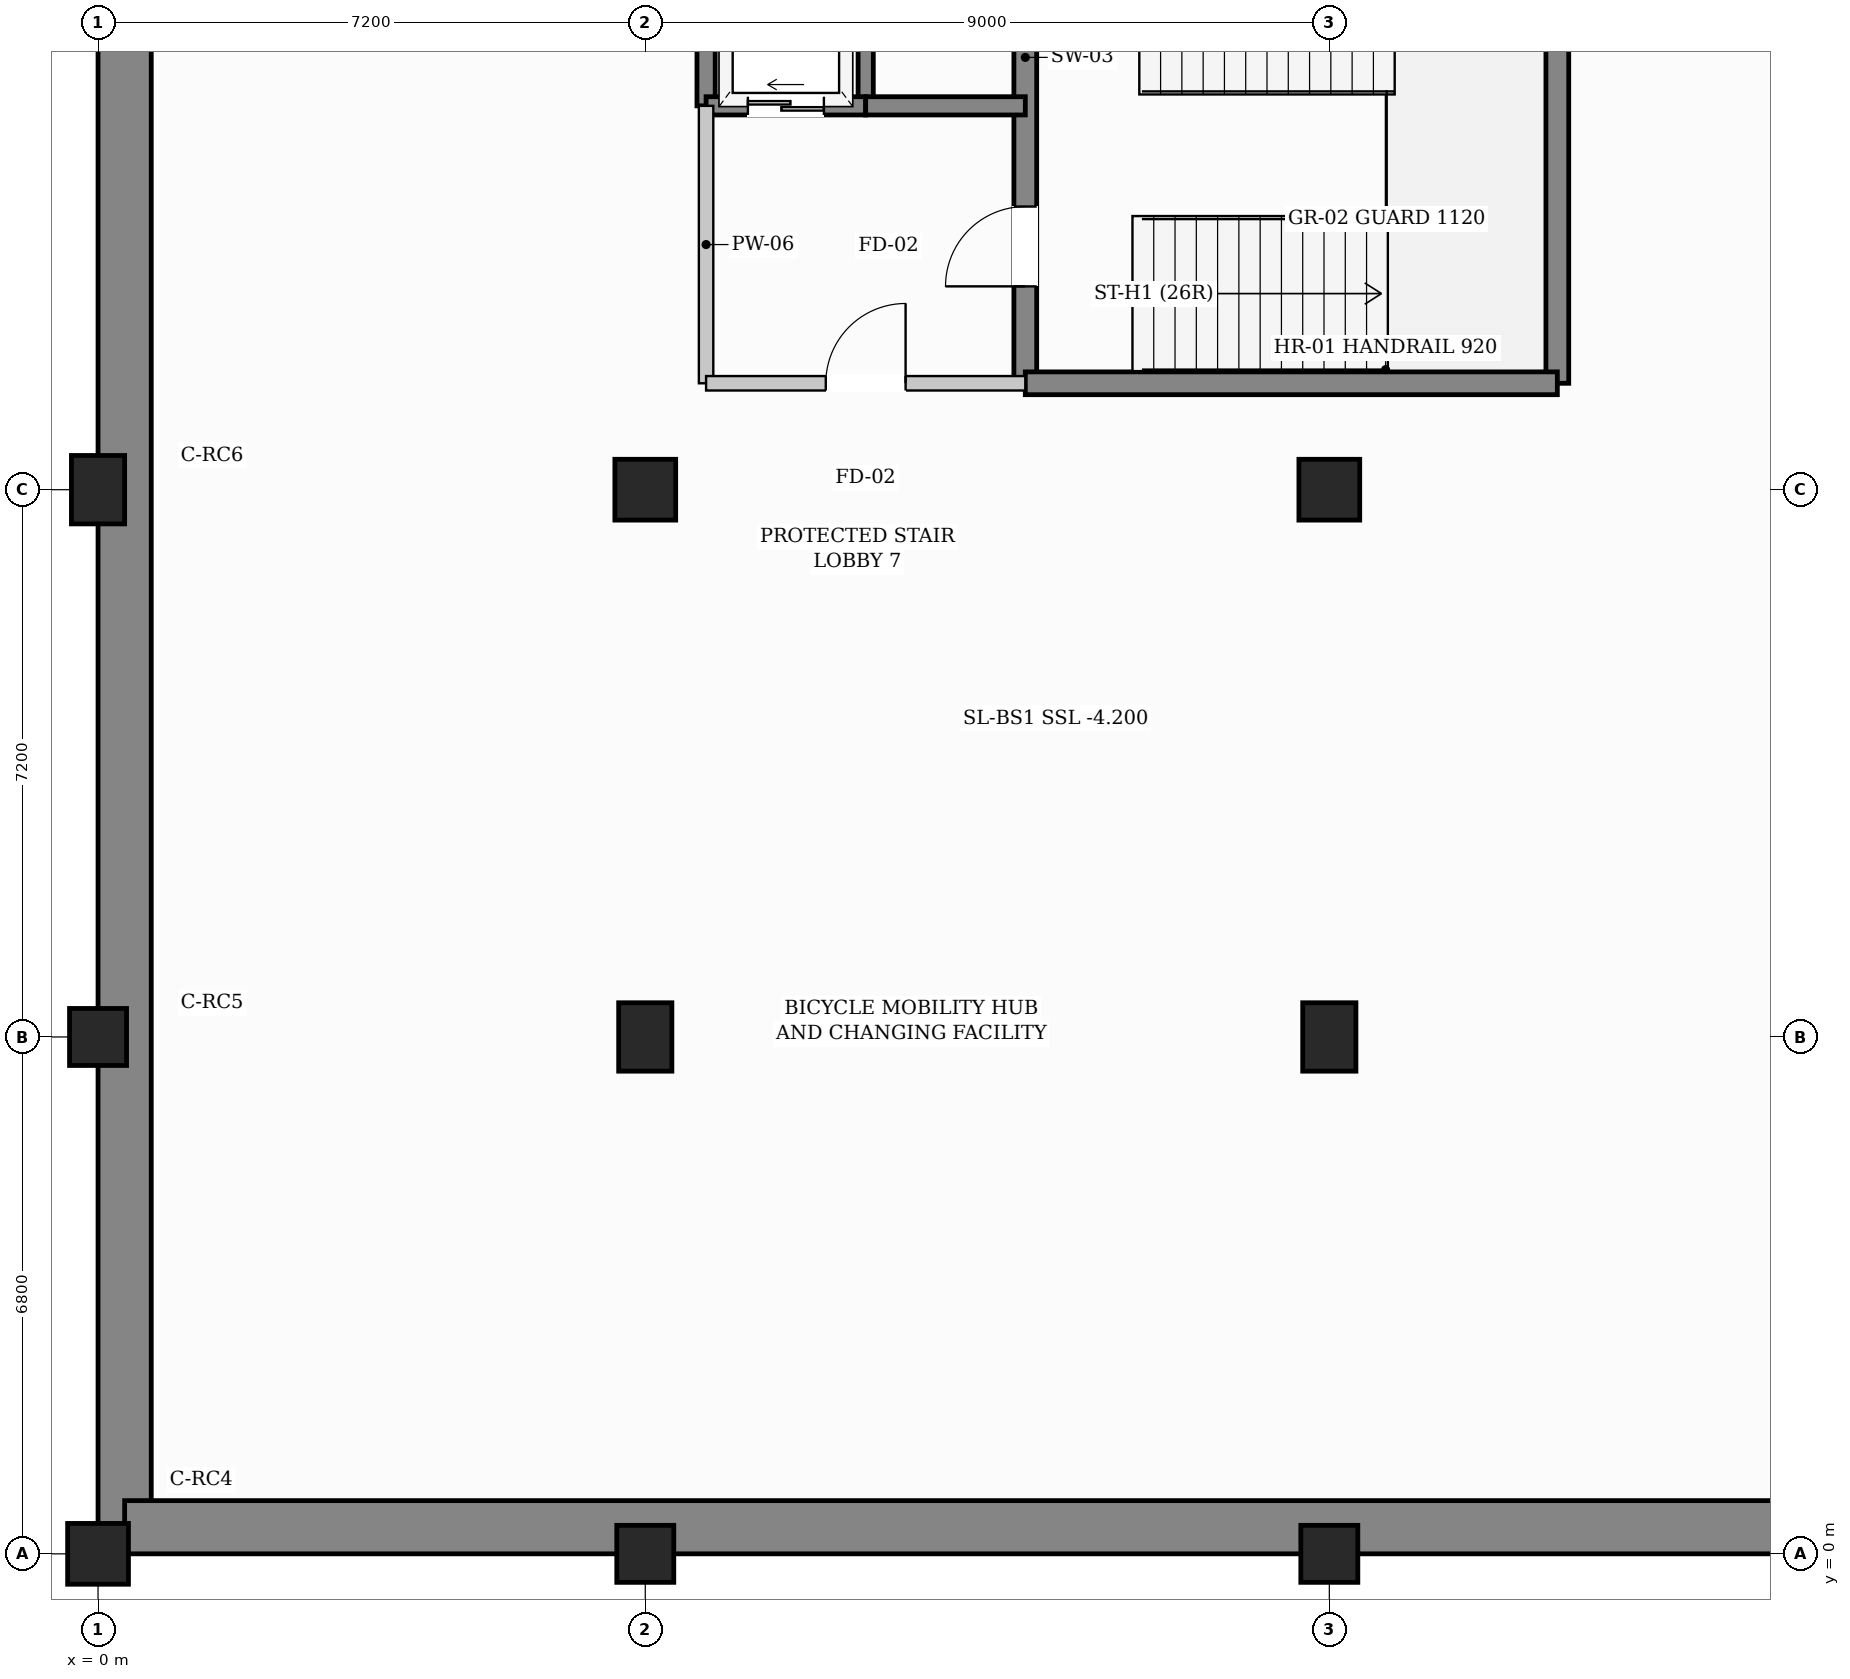
"""IFC4 building model, lengths in metres.
Left out: names, types, materials, properties, quantities, classifications, styles, units other than length and angle.
Written with IfcOpenShell. Run it as: python <this file> out.ifc"""

import sys

from ifc_helpers import new_model, si_unit, direction, frame, frame_2d, origin, origin_with_axes, origin_2d, place, context, subcontext, project, spatial, rectangle, extrude, element, fill, save


model = new_model("IFC4")
c1 = context("Model", 3, precision=1e-05, world=origin(), true_north=direction((0.0, 1.0)))
c2 = subcontext(c1, "Body", "Model", "MODEL_VIEW")
j1 = project(units=[si_unit("LENGTHUNIT", "METRE"), si_unit("PLANEANGLEUNIT", "RADIAN")], contexts=[c1])
p1 = place(None, origin())
s1 = spatial("IfcSite", under=j1, at=p1, CompositionType="ELEMENT")
p2 = place(p1, origin())
s2 = spatial("IfcBuilding", under=s1, at=p2, CompositionType="ELEMENT")
p3 = place(p2, frame((0.0, 0.0, -4.2)))
s3 = spatial("IfcBuildingStorey", under=s2, at=p3, CompositionType="ELEMENT", Elevation=-4.2)
p4 = place(p3, origin_with_axes())
e1 = element("IfcColumn", 1, at=p4, inside=s3, PredefinedType="COLUMN", context=c2, shape_type="SweptSolid", body=[
    extrude(rectangle(XDim=0.8, YDim=0.8, at=origin_2d()), origin(), (0.0, 0.0, 1.0), 4.2),
])
p5 = place(p3, frame((0.0, 6.8, 0.0), z_axis=(0.0, 0.0, 1.0), x_axis=(1.0, 0.0, 0.0)))
e2 = element("IfcColumn", 2, at=p5, inside=s3, PredefinedType="COLUMN", context=c2, shape_type="SweptSolid", body=[
    extrude(rectangle(XDim=0.75, YDim=0.75, at=origin_2d()), origin(), (0.0, 0.0, 1.0), 4.2),
])
p6 = place(p3, frame((0.0, 14.0, 0.0), z_axis=(0.0, 0.0, 1.0), x_axis=(1.0, 0.0, 0.0)))
e3 = element("IfcColumn", 3, at=p6, inside=s3, PredefinedType="COLUMN", context=c2, shape_type="SweptSolid", body=[
    extrude(rectangle(XDim=0.7, YDim=0.9, at=origin_2d()), origin(), (0.0, 0.0, 1.0), 4.2),
])
p7 = place(p3, frame((7.2, 0.0, 0.0), z_axis=(0.0, 0.0, 1.0), x_axis=(1.0, 0.0, 0.0)))
e4 = element("IfcColumn", 4, at=p7, inside=s3, PredefinedType="COLUMN", context=c2, shape_type="SweptSolid", body=[
    extrude(rectangle(XDim=0.75, YDim=0.75, at=origin_2d()), origin(), (0.0, 0.0, 1.0), 4.2),
])
p8 = place(p3, frame((7.2, 6.8, 0.0), z_axis=(0.0, 0.0, 1.0), x_axis=(1.0, 0.0, 0.0)))
e5 = element("IfcColumn", 5, at=p8, inside=s3, PredefinedType="COLUMN", context=c2, shape_type="SweptSolid", body=[
    extrude(rectangle(XDim=0.7, YDim=0.9, at=origin_2d()), origin(), (0.0, 0.0, 1.0), 4.2),
])
p9 = place(p3, frame((7.2, 14.0, 0.0), z_axis=(0.0, 0.0, 1.0), x_axis=(1.0, 0.0, 0.0)))
e6 = element("IfcColumn", 6, at=p9, inside=s3, PredefinedType="COLUMN", context=c2, shape_type="SweptSolid", body=[
    extrude(rectangle(XDim=0.8, YDim=0.8, at=origin_2d()), origin(), (0.0, 0.0, 1.0), 4.2),
])
p10 = place(p3, frame((16.2, 0.0, 0.0), z_axis=(0.0, 0.0, 1.0), x_axis=(1.0, 0.0, 0.0)))
e7 = element("IfcColumn", 7, at=p10, inside=s3, PredefinedType="COLUMN", context=c2, shape_type="SweptSolid", body=[
    extrude(rectangle(XDim=0.75, YDim=0.75, at=origin_2d()), origin(), (0.0, 0.0, 1.0), 4.2),
])
p11 = place(p3, frame((16.2, 6.8, 0.0), z_axis=(0.0, 0.0, 1.0), x_axis=(1.0, 0.0, 0.0)))
e8 = element("IfcColumn", 8, at=p11, inside=s3, PredefinedType="COLUMN", context=c2, shape_type="SweptSolid", body=[
    extrude(rectangle(XDim=0.7, YDim=0.9, at=origin_2d()), origin(), (0.0, 0.0, 1.0), 4.2),
])
p12 = place(p3, frame((16.2, 14.0, 0.0), z_axis=(0.0, 0.0, 1.0), x_axis=(1.0, 0.0, 0.0)))
e9 = element("IfcColumn", 9, at=p12, inside=s3, PredefinedType="COLUMN", context=c2, shape_type="SweptSolid", body=[
    extrude(rectangle(XDim=0.8, YDim=0.8, at=origin_2d()), origin(), (0.0, 0.0, 1.0), 4.2),
])
p13 = place(p3, frame((0.35, 0.35, 0.0), z_axis=(0.0, 0.0, 1.0), x_axis=(0.0, 1.0, 0.0)))
e10 = element("IfcWall", 10, at=p13, inside=s3, PredefinedType="SOLIDWALL", context=c2, shape_type="SweptSolid", body=[
    extrude(rectangle(XDim=115.3, YDim=0.7, at=frame_2d((57.65, 0.0))), origin(), (0.0, 0.0, 1.0), 3.84),
])
p14 = place(p3, frame((96.825, 0.35, 0.0), z_axis=(0.0, 0.0, 1.0), x_axis=(-1.0, 0.0, 0.0)))
e11 = element("IfcWall", 11, at=p14, inside=s3, PredefinedType="SOLIDWALL", context=c2, shape_type="SweptSolid", body=[
    extrude(rectangle(XDim=96.475, YDim=0.7, at=frame_2d((48.237, 0.0))), origin(), (0.0, 0.0, 1.0), 3.84),
])
p15 = place(p3, frame((12.2, 15.4, 0.0), z_axis=(0.0, 0.0, 1.0), x_axis=(0.0, 1.0, 0.0)))
e12 = element("IfcWall", 12, at=p15, inside=s3, PredefinedType="SHEAR", context=c2, shape_type="SweptSolid", body=[
    extrude(rectangle(XDim=6.0, YDim=0.3, at=frame_2d((3.0, 0.0))), origin(), (0.0, 0.0, 1.0), 3.84),
])
p16 = place(p15, frame((1.275, 0.0, 0.0)))
e13 = element("IfcOpeningElement", 13, at=p16, cuts=e12, PredefinedType="OPENING", context=c2, shape_type="SweptSolid", body=[
    extrude(rectangle(XDim=1.05, YDim=2.15, at=frame_2d((0.525, 1.075))), frame((0.0, 0.16, 0.0), z_axis=(0.0, -1.0, 0.0), x_axis=(1.0, 0.0, 0.0)), (0.0, 0.0, 1.0), 0.32),
])
p17 = place(p3, frame((19.2, 15.4, 0.0), z_axis=(0.0, 0.0, 1.0), x_axis=(0.0, 1.0, 0.0)))
e14 = element("IfcWall", 14, at=p17, inside=s3, PredefinedType="SHEAR", context=c2, shape_type="SweptSolid", body=[
    extrude(rectangle(XDim=6.0, YDim=0.3, at=frame_2d((3.0, 0.0))), origin(), (0.0, 0.0, 1.0), 3.84),
])
p18 = place(p3, frame((12.2, 15.4, 0.0), z_axis=(0.0, 0.0, 1.0), x_axis=(1.0, 0.0, 0.0)))
e15 = element("IfcWall", 15, at=p18, inside=s3, PredefinedType="SHEAR", context=c2, shape_type="SweptSolid", body=[
    extrude(rectangle(XDim=7.0, YDim=0.3, at=frame_2d((3.5, 0.0))), origin(), (0.0, 0.0, 1.0), 3.84),
])
p19 = place(p3, frame((8.0, 19.05, 0.0), z_axis=(0.0, 0.0, 1.0), x_axis=(0.0, 1.0, 0.0)))
e16 = element("IfcWall", 16, at=p19, inside=s3, PredefinedType="SHEAR", context=c2, shape_type="SweptSolid", body=[
    extrude(rectangle(XDim=2.35, YDim=0.24, at=frame_2d((1.175, 0.0))), origin(), (0.0, 0.0, 1.0), 3.84),
])
p20 = place(p3, frame((10.1, 19.05, 0.0), z_axis=(0.0, 0.0, 1.0), x_axis=(0.0, 1.0, 0.0)))
e17 = element("IfcWall", 17, at=p20, inside=s3, PredefinedType="SHEAR", context=c2, shape_type="SweptSolid", body=[
    extrude(rectangle(XDim=2.35, YDim=0.2, at=frame_2d((1.175, 0.0))), origin(), (0.0, 0.0, 1.0), 3.84),
])
p21 = place(p3, frame((8.0, 19.05, 0.0), z_axis=(0.0, 0.0, 1.0), x_axis=(1.0, 0.0, 0.0)))
e18 = element("IfcWall", 18, at=p21, inside=s3, PredefinedType="SHEAR", context=c2, shape_type="SweptSolid", body=[
    extrude(rectangle(XDim=2.1, YDim=0.24, at=frame_2d((1.05, 0.0))), origin(), (0.0, 0.0, 1.0), 3.84),
])
p22 = place(p21, frame((0.55, 0.0, 0.0)))
e19 = element("IfcOpeningElement", 19, at=p22, cuts=e18, PredefinedType="OPENING", context=c2, shape_type="SweptSolid", body=[
    extrude(rectangle(XDim=1.0, YDim=2.1, at=frame_2d((0.5, 1.05))), frame((0.0, 0.13, 0.0), z_axis=(0.0, -1.0, 0.0), x_axis=(1.0, 0.0, 0.0)), (0.0, 0.0, 1.0), 0.26),
])
p23 = place(p3, frame((10.1, 19.05, 0.0), z_axis=(0.0, 0.0, 1.0), x_axis=(1.0, 0.0, 0.0)))
e20 = element("IfcWall", 20, at=p23, inside=s3, PredefinedType="SHEAR", context=c2, shape_type="SweptSolid", body=[
    extrude(rectangle(XDim=2.1, YDim=0.24, at=frame_2d((1.05, 0.0))), origin(), (0.0, 0.0, 1.0), 3.84),
])
p24 = place(p3, frame((8.0, 15.4, 0.0), z_axis=(0.0, 0.0, 1.0), x_axis=(0.0, 1.0, 0.0)))
e21 = element("IfcWall", 21, at=p24, inside=s3, PredefinedType="PARTITIONING", context=c2, shape_type="SweptSolid", body=[
    extrude(rectangle(XDim=3.65, YDim=0.19, at=frame_2d((1.825, 0.0))), origin(), (0.0, 0.0, 1.0), 3.84),
])
p25 = place(p3, frame((8.0, 15.4, 0.0), z_axis=(0.0, 0.0, 1.0), x_axis=(1.0, 0.0, 0.0)))
e22 = element("IfcWall", 22, at=p25, inside=s3, PredefinedType="PARTITIONING", context=c2, shape_type="SweptSolid", body=[
    extrude(rectangle(XDim=4.2, YDim=0.19, at=frame_2d((2.1, 0.0))), origin(), (0.0, 0.0, 1.0), 3.84),
])
p26 = place(p25, frame((1.575, 0.0, 0.0)))
e23 = element("IfcOpeningElement", 23, at=p26, cuts=e22, PredefinedType="OPENING", context=c2, shape_type="SweptSolid", body=[
    extrude(rectangle(XDim=1.05, YDim=2.15, at=frame_2d((0.525, 1.075))), frame((0.0, 0.105, 0.0), z_axis=(0.0, -1.0, 0.0), x_axis=(1.0, 0.0, 0.0)), (0.0, 0.0, 1.0), 0.21),
])
p27 = place(p16, origin())
e24 = element("IfcDoor", 24, at=p27, inside=s3, OperationType="SINGLE_SWING_LEFT", PredefinedType="DOOR", context=c2, shape_type="SweptSolid", body=[
    extrude(rectangle(XDim=1.05, YDim=2.15, at=frame_2d((0.525, 1.075))), frame((0.0, 0.025, 0.0), z_axis=(0.0, -1.0, 0.0), x_axis=(1.0, 0.0, 0.0)), (0.0, 0.0, 1.0), 0.05),
])
fill(e13, e24)
p28 = place(p22, origin())
e25 = element("IfcDoor", 25, at=p28, inside=s3, OperationType="SLIDING_TO_LEFT", PredefinedType="DOOR", context=c2, shape_type="SweptSolid", body=[
    extrude(rectangle(XDim=1.0, YDim=2.1, at=frame_2d((0.5, 1.05))), frame((0.0, 0.025, 0.0), z_axis=(0.0, -1.0, 0.0), x_axis=(1.0, 0.0, 0.0)), (0.0, 0.0, 1.0), 0.05),
])
fill(e19, e25)
p29 = place(p26, origin())
e26 = element("IfcDoor", 26, at=p29, inside=s3, OperationType="SINGLE_SWING_RIGHT", PredefinedType="DOOR", context=c2, shape_type="SweptSolid", body=[
    extrude(rectangle(XDim=1.05, YDim=2.15, at=frame_2d((0.525, 1.075))), frame((0.0, 0.025, 0.0), z_axis=(0.0, -1.0, 0.0), x_axis=(1.0, 0.0, 0.0)), (0.0, 0.0, 1.0), 0.05),
])
fill(e23, e26)
save(model, sys.argv[1])
